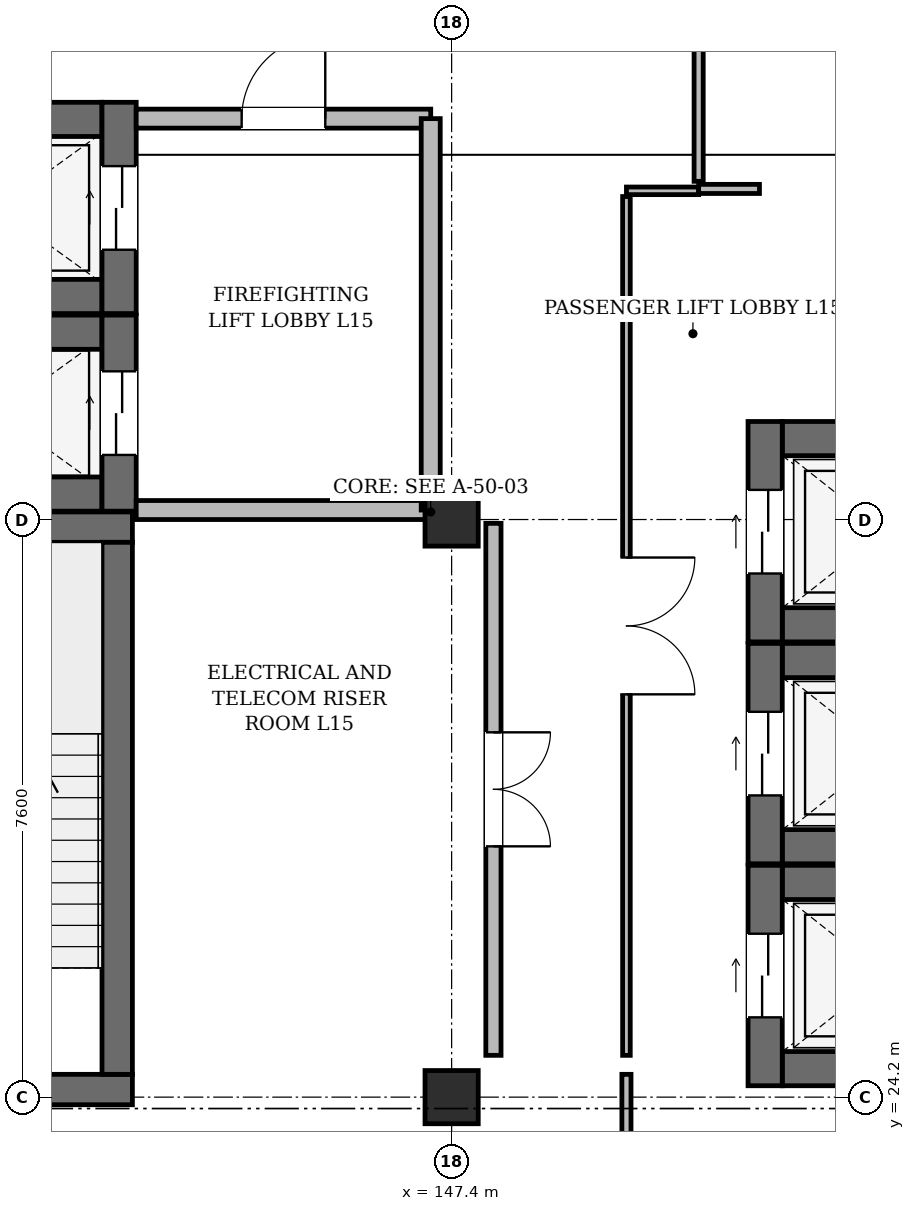
"""IFC4 building model, lengths in metres.
Left out: names, types, materials, properties, quantities, classifications, styles, units other than length and angle.
Written with IfcOpenShell. Run it as: python <this file> out.ifc"""

import sys

from ifc_helpers import new_model, si_unit, direction, frame, frame_2d, origin, origin_2d, place, context, subcontext, project, spatial, rectangle, extrude, element, fill, save


model = new_model("IFC4")
c1 = context("Model", 3, precision=1e-05, world=origin(), true_north=direction((0.0, 1.0)))
c2 = subcontext(c1, "Body", "Model", "MODEL_VIEW")
j1 = project(units=[si_unit("LENGTHUNIT", "METRE"), si_unit("PLANEANGLEUNIT", "RADIAN")], contexts=[c1])
p1 = place(None, origin())
s1 = spatial("IfcSite", under=j1, at=p1, CompositionType="ELEMENT")
p2 = place(p1, origin())
s2 = spatial("IfcBuilding", under=s1, at=p2, CompositionType="ELEMENT")
p3 = place(p2, frame((0.0, 0.0, 66.2)))
s3 = spatial("IfcBuildingStorey", under=s2, at=p3, CompositionType="ELEMENT", Elevation=66.2)
for number, where, z_axis, x_axis in (
    (1, (147.4, 24.2, 0.0), (0.0, 0.0, 1.0), (1.0, 0.0, 0.0)),
    (2, (147.4, 31.8, 0.0), (0.0, 0.0, 1.0), (1.0, 0.0, 0.0)),
):
    element("IfcColumn", number, at=place(p3, frame(where, z_axis=z_axis, x_axis=x_axis)), inside=s3, PredefinedType="COLUMN", context=c2, shape_type="SweptSolid", body=[
        extrude(rectangle(XDim=0.7, YDim=0.7, at=origin_2d()), origin(), (0.0, 0.0, 1.0), 3.76),
    ])
p4 = place(p3, frame((139.4, 24.3, 0.0), z_axis=(0.0, 0.0, 1.0), x_axis=(1.0, 0.0, 0.0)))
e3 = element("IfcWall", 3, at=p4, inside=s3, PredefinedType="SHEAR", context=c2, shape_type="SweptSolid", body=[
    extrude(rectangle(XDim=3.8, YDim=0.4, at=frame_2d((1.9, 0.0))), origin(), (0.0, 0.0, 1.0), 3.76),
])
p5 = place(p4, frame((1.3, 0.0, 0.0)))
e4 = element("IfcOpeningElement", 4, at=p5, cuts=e3, PredefinedType="OPENING", context=c2, shape_type="SweptSolid", body=[
    extrude(rectangle(XDim=1.2, YDim=2.2, at=frame_2d((0.6, 1.1))), frame((0.0, 0.212, 0.0), z_axis=(0.0, -1.0, 0.0), x_axis=(1.0, 0.0, 0.0)), (0.0, 0.0, 1.0), 0.424),
])
p6 = place(p3, frame((139.4, 31.7, 0.0), z_axis=(0.0, 0.0, 1.0), x_axis=(1.0, 0.0, 0.0)))
e5 = element("IfcWall", 5, at=p6, inside=s3, PredefinedType="SHEAR", context=c2, shape_type="SweptSolid", body=[
    extrude(rectangle(XDim=3.8, YDim=0.4, at=frame_2d((1.9, 0.0))), origin(), (0.0, 0.0, 1.0), 3.76),
])
p7 = place(p3, frame((143.0, 24.5, 0.0), z_axis=(0.0, 0.0, 1.0), x_axis=(0.0, 1.0, 0.0)))
e6 = element("IfcWall", 6, at=p7, inside=s3, PredefinedType="SHEAR", context=c2, shape_type="SweptSolid", body=[
    extrude(rectangle(XDim=7.0, YDim=0.4, at=frame_2d((3.5, 0.0))), origin(), (0.0, 0.0, 1.0), 3.76),
])
for number, where, z_axis, x_axis in (
    (7, (140.06, 32.135, 0.0), (0.0, 0.0, 1.0), (1.0, 0.0, 0.0)),
    (8, (140.06, 34.265, 0.0), (0.0, 0.0, 1.0), (1.0, 0.0, 0.0)),
):
    element("IfcWall", number, at=place(p3, frame(where, z_axis=z_axis, x_axis=x_axis)), inside=s3, PredefinedType="SHEAR", context=c2, shape_type="SweptSolid", body=[
        extrude(rectangle(XDim=2.74, YDim=0.45, at=frame_2d((1.37, 0.0))), origin(), (0.0, 0.0, 1.0), 3.76),
    ])
p8 = place(p3, frame((143.025, 31.91, 0.0), z_axis=(0.0, 0.0, 1.0), x_axis=(0.0, 1.0, 0.0)))
e9 = element("IfcWall", 9, at=p8, inside=s3, PredefinedType="SHEAR", context=c2, shape_type="SweptSolid", body=[
    extrude(rectangle(XDim=2.58, YDim=0.45, at=frame_2d((1.29, 0.0))), origin(), (0.0, 0.0, 1.0), 3.76),
])
p9 = place(p8, frame((0.74, 0.0, 0.0)))
e10 = element("IfcOpeningElement", 10, at=p9, cuts=e9, PredefinedType="OPENING", context=c2, shape_type="SweptSolid", body=[
    extrude(rectangle(XDim=1.1, YDim=2.2, at=frame_2d((0.55, 1.1))), frame((0.0, 0.237, 0.0), z_axis=(0.0, -1.0, 0.0), x_axis=(1.0, 0.0, 0.0)), (0.0, 0.0, 1.0), 0.474),
])
for number, where, z_axis, x_axis in (
    (11, (140.06, 34.735, 0.0), (0.0, 0.0, 1.0), (1.0, 0.0, 0.0)),
    (12, (140.06, 37.065, 0.0), (0.0, 0.0, 1.0), (1.0, 0.0, 0.0)),
):
    element("IfcWall", number, at=place(p3, frame(where, z_axis=z_axis, x_axis=x_axis)), inside=s3, PredefinedType="SHEAR", context=c2, shape_type="SweptSolid", body=[
        extrude(rectangle(XDim=2.74, YDim=0.45, at=frame_2d((1.37, 0.0))), origin(), (0.0, 0.0, 1.0), 3.76),
    ])
p10 = place(p3, frame((143.025, 34.51, 0.0), z_axis=(0.0, 0.0, 1.0), x_axis=(0.0, 1.0, 0.0)))
e13 = element("IfcWall", 13, at=p10, inside=s3, PredefinedType="SHEAR", context=c2, shape_type="SweptSolid", body=[
    extrude(rectangle(XDim=2.78, YDim=0.45, at=frame_2d((1.39, 0.0))), origin(), (0.0, 0.0, 1.0), 3.76),
])
p11 = place(p10, frame((0.84, 0.0, 0.0)))
e14 = element("IfcOpeningElement", 14, at=p11, cuts=e13, PredefinedType="OPENING", context=c2, shape_type="SweptSolid", body=[
    extrude(rectangle(XDim=1.1, YDim=2.2, at=frame_2d((0.55, 1.1))), frame((0.0, 0.237, 0.0), z_axis=(0.0, -1.0, 0.0), x_axis=(1.0, 0.0, 0.0)), (0.0, 0.0, 1.0), 0.474),
])
for number, where, z_axis, x_axis in (
    (15, (151.75, 24.575, 0.0), (0.0, 0.0, 1.0), (1.0, 0.0, 0.0)),
    (16, (151.75, 27.025, 0.0), (0.0, 0.0, 1.0), (1.0, 0.0, 0.0)),
):
    element("IfcWall", number, at=place(p3, frame(where, z_axis=z_axis, x_axis=x_axis)), inside=s3, PredefinedType="SHEAR", context=c2, shape_type="SweptSolid", body=[
        extrude(rectangle(XDim=2.7, YDim=0.45, at=frame_2d((1.35, 0.0))), origin(), (0.0, 0.0, 1.0), 3.76),
    ])
p12 = place(p3, frame((151.525, 24.35, 0.0), z_axis=(0.0, 0.0, 1.0), x_axis=(0.0, 1.0, 0.0)))
e17 = element("IfcWall", 17, at=p12, inside=s3, PredefinedType="SHEAR", context=c2, shape_type="SweptSolid", body=[
    extrude(rectangle(XDim=2.9, YDim=0.45, at=frame_2d((1.45, 0.0))), origin(), (0.0, 0.0, 1.0), 3.76),
])
p13 = place(p12, frame((0.9, 0.0, 0.0)))
e18 = element("IfcOpeningElement", 18, at=p13, cuts=e17, PredefinedType="OPENING", context=c2, shape_type="SweptSolid", body=[
    extrude(rectangle(XDim=1.1, YDim=2.2, at=frame_2d((0.55, 1.1))), frame((0.0, 0.237, 0.0), z_axis=(0.0, -1.0, 0.0), x_axis=(1.0, 0.0, 0.0)), (0.0, 0.0, 1.0), 0.474),
])
for number, where, z_axis, x_axis in (
    (19, (151.75, 27.495, 0.0), (0.0, 0.0, 1.0), (1.0, 0.0, 0.0)),
    (20, (151.75, 29.945, 0.0), (0.0, 0.0, 1.0), (1.0, 0.0, 0.0)),
):
    element("IfcWall", number, at=place(p3, frame(where, z_axis=z_axis, x_axis=x_axis)), inside=s3, PredefinedType="SHEAR", context=c2, shape_type="SweptSolid", body=[
        extrude(rectangle(XDim=2.7, YDim=0.45, at=frame_2d((1.35, 0.0))), origin(), (0.0, 0.0, 1.0), 3.76),
    ])
p14 = place(p3, frame((151.525, 27.27, 0.0), z_axis=(0.0, 0.0, 1.0), x_axis=(0.0, 1.0, 0.0)))
e21 = element("IfcWall", 21, at=p14, inside=s3, PredefinedType="SHEAR", context=c2, shape_type="SweptSolid", body=[
    extrude(rectangle(XDim=2.9, YDim=0.45, at=frame_2d((1.45, 0.0))), origin(), (0.0, 0.0, 1.0), 3.76),
])
p15 = place(p14, frame((0.9, 0.0, 0.0)))
e22 = element("IfcOpeningElement", 22, at=p15, cuts=e21, PredefinedType="OPENING", context=c2, shape_type="SweptSolid", body=[
    extrude(rectangle(XDim=1.1, YDim=2.2, at=frame_2d((0.55, 1.1))), frame((0.0, 0.237, 0.0), z_axis=(0.0, -1.0, 0.0), x_axis=(1.0, 0.0, 0.0)), (0.0, 0.0, 1.0), 0.474),
])
for number, where, z_axis, x_axis in (
    (23, (151.75, 30.415, 0.0), (0.0, 0.0, 1.0), (1.0, 0.0, 0.0)),
    (24, (151.75, 32.865, 0.0), (0.0, 0.0, 1.0), (1.0, 0.0, 0.0)),
):
    element("IfcWall", number, at=place(p3, frame(where, z_axis=z_axis, x_axis=x_axis)), inside=s3, PredefinedType="SHEAR", context=c2, shape_type="SweptSolid", body=[
        extrude(rectangle(XDim=2.7, YDim=0.45, at=frame_2d((1.35, 0.0))), origin(), (0.0, 0.0, 1.0), 3.76),
    ])
p16 = place(p3, frame((151.525, 30.19, 0.0), z_axis=(0.0, 0.0, 1.0), x_axis=(0.0, 1.0, 0.0)))
e25 = element("IfcWall", 25, at=p16, inside=s3, PredefinedType="SHEAR", context=c2, shape_type="SweptSolid", body=[
    extrude(rectangle(XDim=2.9, YDim=0.45, at=frame_2d((1.45, 0.0))), origin(), (0.0, 0.0, 1.0), 3.76),
])
p17 = place(p16, frame((0.9, 0.0, 0.0)))
e26 = element("IfcOpeningElement", 26, at=p17, cuts=e25, PredefinedType="OPENING", context=c2, shape_type="SweptSolid", body=[
    extrude(rectangle(XDim=1.1, YDim=2.2, at=frame_2d((0.55, 1.1))), frame((0.0, 0.237, 0.0), z_axis=(0.0, -1.0, 0.0), x_axis=(1.0, 0.0, 0.0)), (0.0, 0.0, 1.0), 0.474),
])
p18 = place(p3, frame((143.25, 37.075, 0.0), z_axis=(0.0, 0.0, 1.0), x_axis=(1.0, 0.0, 0.0)))
e27 = element("IfcWall", 27, at=p18, inside=s3, PredefinedType="SOLIDWALL", context=c2, shape_type="SweptSolid", body=[
    extrude(rectangle(XDim=3.875, YDim=0.25, at=frame_2d((1.938, 0.0))), origin(), (0.0, 0.0, 1.0), 3.605),
])
p19 = place(p18, frame((1.387, 0.0, 0.0)))
e28 = element("IfcOpeningElement", 28, at=p19, cuts=e27, PredefinedType="OPENING", context=c2, shape_type="SweptSolid", body=[
    extrude(rectangle(XDim=1.1, YDim=2.2, at=frame_2d((0.55, 1.1))), frame((0.0, 0.137, 0.0), z_axis=(0.0, -1.0, 0.0), x_axis=(1.0, 0.0, 0.0)), (0.0, 0.0, 1.0), 0.274),
])
p20 = place(p3, frame((143.25, 31.925, 0.0), z_axis=(0.0, 0.0, 1.0), x_axis=(1.0, 0.0, 0.0)))
e29 = element("IfcWall", 29, at=p20, inside=s3, PredefinedType="SOLIDWALL", context=c2, shape_type="SweptSolid", body=[
    extrude(rectangle(XDim=3.875, YDim=0.25, at=frame_2d((1.938, 0.0))), origin(), (0.0, 0.0, 1.0), 3.095),
])
p21 = place(p3, frame((147.125, 31.925, 0.0), z_axis=(0.0, 0.0, 1.0), x_axis=(0.0, 1.0, 0.0)))
e30 = element("IfcWall", 30, at=p21, inside=s3, PredefinedType="SOLIDWALL", context=c2, shape_type="SweptSolid", body=[
    extrude(rectangle(XDim=5.15, YDim=0.25, at=frame_2d((2.575, 0.0))), origin(), (0.0, 0.0, 1.0), 3.095),
])
p22 = place(p3, frame((147.95, 31.75, 0.0), z_axis=(0.0, 0.0, 1.0), x_axis=(0.0, -1.0, 0.0)))
e31 = element("IfcWall", 31, at=p22, inside=s3, PredefinedType="PARTITIONING", context=c2, shape_type="SweptSolid", body=[
    extrude(rectangle(XDim=7.0, YDim=0.2, at=frame_2d((3.5, 0.0))), origin(), (0.0, 0.0, 1.0), 3.605),
])
p23 = place(p22, frame((2.75, 0.0, 0.0)))
e32 = element("IfcOpeningElement", 32, at=p23, cuts=e31, PredefinedType="OPENING", context=c2, shape_type="SweptSolid", body=[
    extrude(rectangle(XDim=1.5, YDim=2.2, at=frame_2d((0.75, 1.1))), frame((0.0, 0.112, 0.0), z_axis=(0.0, -1.0, 0.0), x_axis=(1.0, 0.0, 0.0)), (0.0, 0.0, 1.0), 0.224),
])
p24 = place(p3, frame((149.7, 24.75, 0.0), z_axis=(0.0, 0.0, 1.0), x_axis=(0.0, 1.0, 0.0)))
e33 = element("IfcWall", 33, at=p24, inside=s3, PredefinedType="PARTITIONING", context=c2, shape_type="SweptSolid", body=[
    extrude(rectangle(XDim=11.3, YDim=0.1, at=frame_2d((5.65, 0.0))), origin(), (0.0, 0.0, 1.0), 3.605),
])
p25 = place(p24, frame((4.75, 0.0, 0.0)))
e34 = element("IfcOpeningElement", 34, at=p25, cuts=e33, PredefinedType="OPENING", context=c2, shape_type="SweptSolid", body=[
    extrude(rectangle(XDim=1.8, YDim=2.4, at=frame_2d((0.9, 1.2))), frame((0.0, 0.062, 0.0), z_axis=(0.0, -1.0, 0.0), x_axis=(1.0, 0.0, 0.0)), (0.0, 0.0, 1.0), 0.124),
])
p26 = place(p3, frame((149.7, 36.125, 0.0), z_axis=(0.0, 0.0, 1.0), x_axis=(1.0, 0.0, 0.0)))
e35 = element("IfcWall", 35, at=p26, inside=s3, PredefinedType="PARTITIONING", context=c2, shape_type="SweptSolid", body=[
    extrude(rectangle(XDim=0.95, YDim=0.1, at=frame_2d((0.475, 0.0))), origin(), (0.0, 0.0, 1.0), 3.605),
])
for number, where, z_axis, x_axis in (
    (36, (150.65, 36.15, 0.0), (0.0, 0.0, 1.0), (1.0, 0.0, 0.0)),
    (37, (149.7, 24.5, 0.0), (0.0, 0.0, 1.0), (0.0, -1.0, 0.0)),
):
    element("IfcWall", number, at=place(p3, frame(where, z_axis=z_axis, x_axis=x_axis)), inside=s3, PredefinedType="PARTITIONING", context=c2, shape_type="SweptSolid", body=[
        extrude(rectangle(XDim=0.8, YDim=0.12, at=frame_2d((0.4, 0.0))), origin(), (0.0, 0.0, 1.0), 3.605),
    ])
p27 = place(p3, frame((150.65, 47.0, 0.0), z_axis=(0.0, 0.0, 1.0), x_axis=(0.0, -1.0, 0.0)))
e38 = element("IfcWall", 38, at=p27, inside=s3, PredefinedType="PARTITIONING", context=c2, shape_type="SweptSolid", body=[
    extrude(rectangle(XDim=10.75, YDim=0.12, at=frame_2d((5.375, 0.0))), origin(), (0.0, 0.0, 1.0), 3.605),
])
p28 = place(p27, frame((4.9, 0.0, 0.0)))
e39 = element("IfcOpeningElement", 39, at=p28, cuts=e38, PredefinedType="OPENING", context=c2, shape_type="SweptSolid", body=[
    extrude(rectangle(XDim=0.95, YDim=2.2, at=frame_2d((0.475, 1.1))), frame((0.0, 0.072, 0.0), z_axis=(0.0, -1.0, 0.0), x_axis=(1.0, 0.0, 0.0)), (0.0, 0.0, 1.0), 0.144),
])
p29 = place(p9, origin())
e40 = element("IfcDoor", 40, at=p29, inside=s3, OperationType="DOUBLE_DOOR_SLIDING", PredefinedType="DOOR", context=c2, shape_type="SweptSolid", body=[
    extrude(rectangle(XDim=1.1, YDim=2.2, at=frame_2d((0.55, 1.1))), frame((0.0, 0.025, 0.0), z_axis=(0.0, -1.0, 0.0), x_axis=(1.0, 0.0, 0.0)), (0.0, 0.0, 1.0), 0.05),
])
fill(e10, e40)
p30 = place(p11, origin())
e41 = element("IfcDoor", 41, at=p30, inside=s3, OperationType="DOUBLE_DOOR_SLIDING", PredefinedType="DOOR", context=c2, shape_type="SweptSolid", body=[
    extrude(rectangle(XDim=1.1, YDim=2.2, at=frame_2d((0.55, 1.1))), frame((0.0, 0.025, 0.0), z_axis=(0.0, -1.0, 0.0), x_axis=(1.0, 0.0, 0.0)), (0.0, 0.0, 1.0), 0.05),
])
fill(e14, e41)
p31 = place(p13, origin())
e42 = element("IfcDoor", 42, at=p31, inside=s3, OperationType="DOUBLE_DOOR_SLIDING", PredefinedType="DOOR", context=c2, shape_type="SweptSolid", body=[
    extrude(rectangle(XDim=1.1, YDim=2.2, at=frame_2d((0.55, 1.1))), frame((0.0, 0.025, 0.0), z_axis=(0.0, -1.0, 0.0), x_axis=(1.0, 0.0, 0.0)), (0.0, 0.0, 1.0), 0.05),
])
fill(e18, e42)
p32 = place(p15, origin())
e43 = element("IfcDoor", 43, at=p32, inside=s3, OperationType="DOUBLE_DOOR_SLIDING", PredefinedType="DOOR", context=c2, shape_type="SweptSolid", body=[
    extrude(rectangle(XDim=1.1, YDim=2.2, at=frame_2d((0.55, 1.1))), frame((0.0, 0.025, 0.0), z_axis=(0.0, -1.0, 0.0), x_axis=(1.0, 0.0, 0.0)), (0.0, 0.0, 1.0), 0.05),
])
fill(e22, e43)
p33 = place(p17, origin())
e44 = element("IfcDoor", 44, at=p33, inside=s3, OperationType="DOUBLE_DOOR_SLIDING", PredefinedType="DOOR", context=c2, shape_type="SweptSolid", body=[
    extrude(rectangle(XDim=1.1, YDim=2.2, at=frame_2d((0.55, 1.1))), frame((0.0, 0.025, 0.0), z_axis=(0.0, -1.0, 0.0), x_axis=(1.0, 0.0, 0.0)), (0.0, 0.0, 1.0), 0.05),
])
fill(e26, e44)
p34 = place(p19, origin())
e45 = element("IfcDoor", 45, at=p34, inside=s3, OperationType="SINGLE_SWING_RIGHT", PredefinedType="DOOR", context=c2, shape_type="SweptSolid", body=[
    extrude(rectangle(XDim=1.1, YDim=2.2, at=frame_2d((0.55, 1.1))), frame((0.0, 0.025, 0.0), z_axis=(0.0, -1.0, 0.0), x_axis=(1.0, 0.0, 0.0)), (0.0, 0.0, 1.0), 0.05),
])
fill(e28, e45)
p35 = place(p23, origin())
e46 = element("IfcDoor", 46, at=p35, inside=s3, OperationType="DOUBLE_DOOR_SINGLE_SWING", PredefinedType="DOOR", context=c2, shape_type="SweptSolid", body=[
    extrude(rectangle(XDim=1.5, YDim=2.2, at=frame_2d((0.75, 1.1))), frame((0.0, 0.025, 0.0), z_axis=(0.0, -1.0, 0.0), x_axis=(1.0, 0.0, 0.0)), (0.0, 0.0, 1.0), 0.05),
])
fill(e32, e46)
p36 = place(p25, frame((1.8, 0.0, 0.0), z_axis=(0.0, 0.0, 1.0), x_axis=(-1.0, 0.0, 0.0)))
e47 = element("IfcDoor", 47, at=p36, inside=s3, OperationType="DOUBLE_DOOR_SINGLE_SWING", PredefinedType="DOOR", context=c2, shape_type="SweptSolid", body=[
    extrude(rectangle(XDim=1.8, YDim=2.4, at=frame_2d((0.9, 1.2))), frame((0.0, 0.025, 0.0), z_axis=(0.0, -1.0, 0.0), x_axis=(1.0, 0.0, 0.0)), (0.0, 0.0, 1.0), 0.05),
])
fill(e34, e47)
save(model, sys.argv[1])
